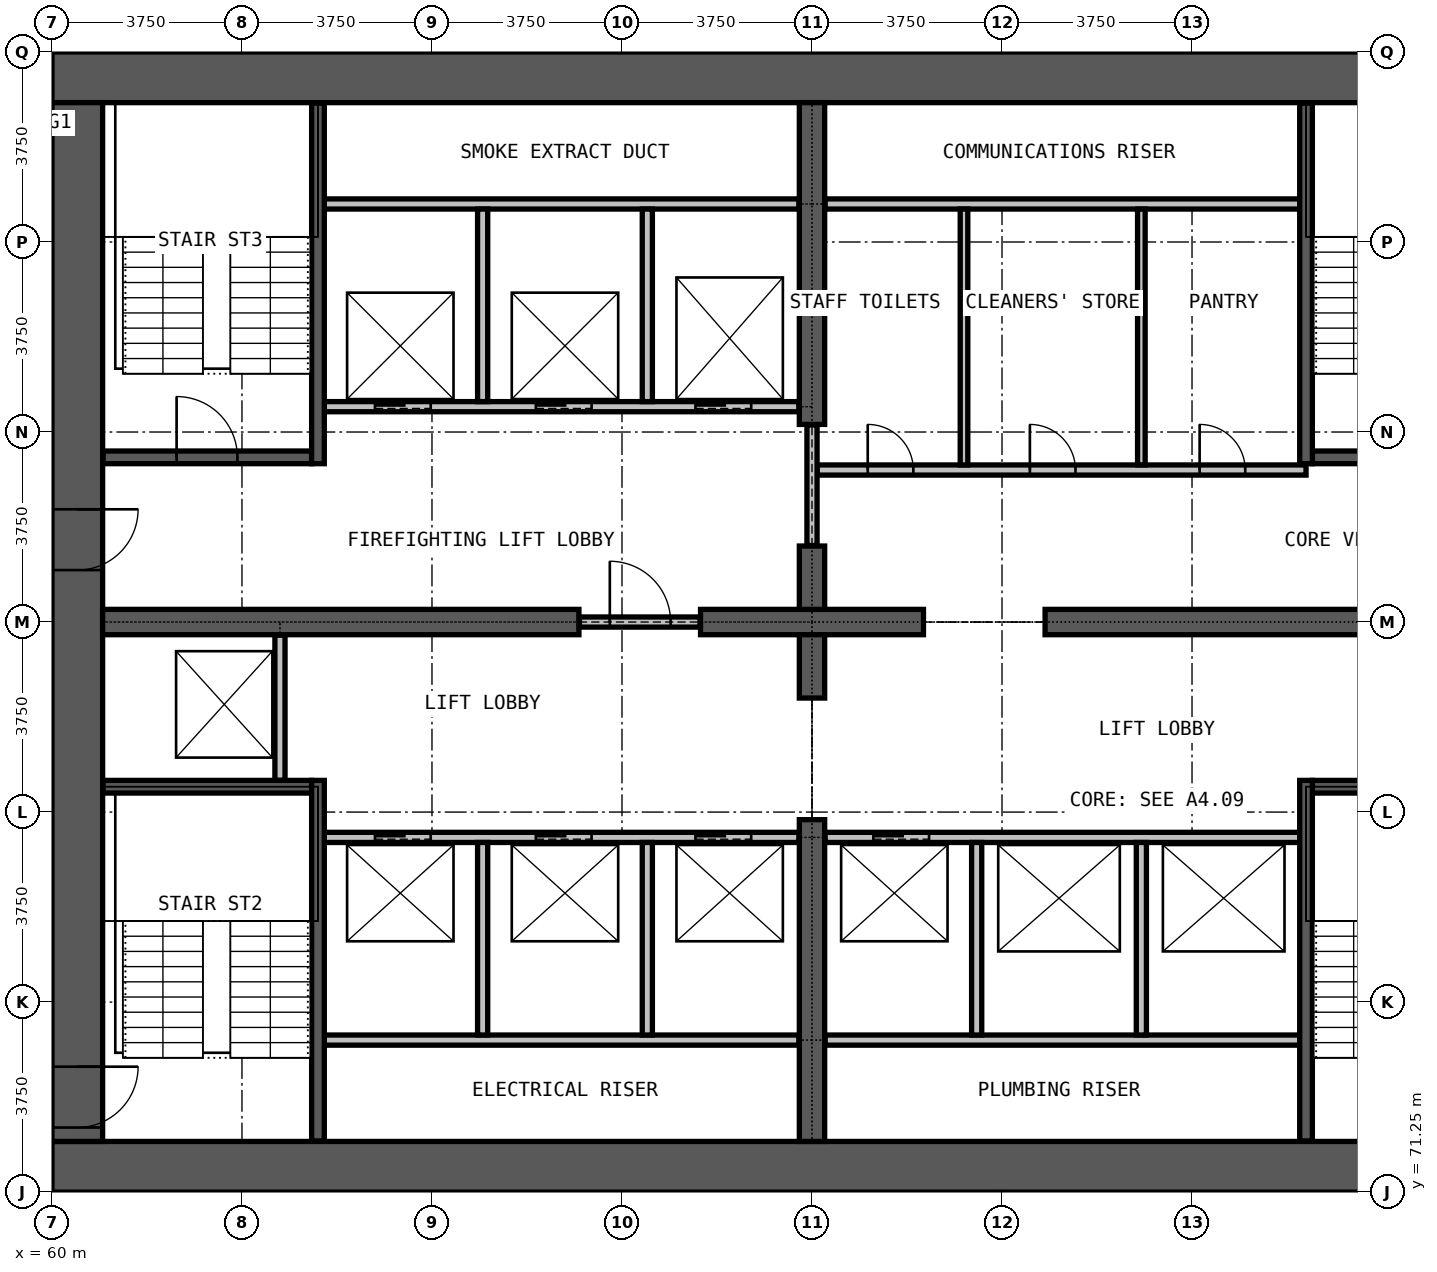
"""IFC4 building model, lengths in metres.
Left out: names, types, materials, properties, quantities, classifications, styles, units other than length and angle.
Written with IfcOpenShell. Run it as: python <this file> out.ifc"""

import sys

from ifc_helpers import new_model, si_unit, direction, frame, frame_2d, origin, place, context, subcontext, project, spatial, rectangle, extrude, element, fill, save


model = new_model("IFC4")
c1 = context("Model", 3, precision=1e-05, world=origin(), true_north=direction((0.0, 1.0)))
c2 = subcontext(c1, "Body", "Model", "MODEL_VIEW")
j1 = project(units=[si_unit("LENGTHUNIT", "METRE"), si_unit("PLANEANGLEUNIT", "RADIAN")], contexts=[c1])
p1 = place(None, origin())
s1 = spatial("IfcSite", under=j1, at=p1, CompositionType="ELEMENT")
p2 = place(p1, origin())
s2 = spatial("IfcBuilding", under=s1, at=p2, CompositionType="ELEMENT")
p3 = place(p2, frame((0.0, 0.0, 82.4)))
s3 = spatial("IfcBuildingStorey", under=s2, at=p3, CompositionType="ELEMENT", Elevation=82.4)
for number, where, z_axis, x_axis in (
    (1, (60.0, 71.75, 0.0), (0.0, 0.0, 1.0), (1.0, 0.0, 0.0)),
    (2, (90.0, 93.25, 0.0), (0.0, 0.0, 1.0), (-1.0, 0.0, 0.0)),
):
    element("IfcWall", number, at=place(p3, frame(where, z_axis=z_axis, x_axis=x_axis)), inside=s3, PredefinedType="SHEAR", context=c2, shape_type="SweptSolid", body=[
        extrude(rectangle(XDim=30.0, YDim=1.0, at=frame_2d((15.0, 0.0))), origin(), (0.0, 0.0, 1.0), 3.3),
    ])
p4 = place(p3, frame((60.5, 92.75, 0.0), z_axis=(0.0, 0.0, 1.0), x_axis=(0.0, -1.0, 0.0)))
e3 = element("IfcWall", 3, at=p4, inside=s3, PredefinedType="SHEAR", context=c2, shape_type="SweptSolid", body=[
    extrude(rectangle(XDim=20.5, YDim=1.0, at=frame_2d((10.25, 0.0))), origin(), (0.0, 0.0, 1.0), 3.3),
])
p5 = place(p4, frame((19.025, 0.0, 0.0)))
e4 = element("IfcOpeningElement", 4, at=p5, cuts=e3, PredefinedType="OPENING", context=c2, shape_type="SweptSolid", body=[
    extrude(rectangle(XDim=1.2, YDim=2.2, at=frame_2d((0.6, 1.1))), frame((0.0, 0.51, 0.0), z_axis=(0.0, -1.0, 0.0), x_axis=(1.0, 0.0, 0.0)), (0.0, 0.0, 1.0), 1.02),
])
p6 = place(p4, frame((8.025, 0.0, 0.0)))
e5 = element("IfcOpeningElement", 5, at=p6, cuts=e3, PredefinedType="OPENING", context=c2, shape_type="SweptSolid", body=[
    extrude(rectangle(XDim=1.2, YDim=2.2, at=frame_2d((0.6, 1.1))), frame((0.0, 0.51, 0.0), z_axis=(0.0, -1.0, 0.0), x_axis=(1.0, 0.0, 0.0)), (0.0, 0.0, 1.0), 1.02),
])
p7 = place(p3, frame((61.0, 82.5, 0.0), z_axis=(0.0, 0.0, 1.0), x_axis=(1.0, 0.0, 0.0)))
e6 = element("IfcWall", 6, at=p7, inside=s3, PredefinedType="SHEAR", context=c2, shape_type="SweptSolid", body=[
    extrude(rectangle(XDim=9.4, YDim=0.5, at=frame_2d((4.7, 0.0))), origin(), (0.0, 0.0, 1.0), 3.3),
])
p8 = place(p3, frame((72.8, 82.5, 0.0), z_axis=(0.0, 0.0, 1.0), x_axis=(1.0, 0.0, 0.0)))
e7 = element("IfcWall", 7, at=p8, inside=s3, PredefinedType="SHEAR", context=c2, shape_type="SweptSolid", body=[
    extrude(rectangle(XDim=4.4, YDim=0.5, at=frame_2d((2.2, 0.0))), origin(), (0.0, 0.0, 1.0), 3.3),
])
p9 = place(p3, frame((79.6, 82.5, 0.0), z_axis=(0.0, 0.0, 1.0), x_axis=(1.0, 0.0, 0.0)))
e8 = element("IfcWall", 8, at=p9, inside=s3, PredefinedType="SHEAR", context=c2, shape_type="SweptSolid", body=[
    extrude(rectangle(XDim=9.4, YDim=0.5, at=frame_2d((4.7, 0.0))), origin(), (0.0, 0.0, 1.0), 3.3),
])
p10 = place(p3, frame((75.0, 72.25, 0.0), z_axis=(0.0, 0.0, 1.0), x_axis=(0.0, 1.0, 0.0)))
e9 = element("IfcWall", 9, at=p10, inside=s3, PredefinedType="SHEAR", context=c2, shape_type="SweptSolid", body=[
    extrude(rectangle(XDim=6.35, YDim=0.5, at=frame_2d((3.175, 0.0))), origin(), (0.0, 0.0, 1.0), 3.3),
])
for number, where, z_axis, x_axis in (
    (10, (75.0, 81.0, 0.0), (0.0, 0.0, 1.0), (0.0, 1.0, 0.0)),
    (11, (75.0, 82.75, 0.0), (0.0, 0.0, 1.0), (0.0, 1.0, 0.0)),
):
    element("IfcWall", number, at=place(p3, frame(where, z_axis=z_axis, x_axis=x_axis)), inside=s3, PredefinedType="SHEAR", context=c2, shape_type="SweptSolid", body=[
        extrude(rectangle(XDim=1.25, YDim=0.5, at=frame_2d((0.625, 0.0))), origin(), (0.0, 0.0, 1.0), 3.3),
    ])
p11 = place(p3, frame((75.0, 86.4, 0.0), z_axis=(0.0, 0.0, 1.0), x_axis=(0.0, 1.0, 0.0)))
e12 = element("IfcWall", 12, at=p11, inside=s3, PredefinedType="SHEAR", context=c2, shape_type="SweptSolid", body=[
    extrude(rectangle(XDim=6.35, YDim=0.5, at=frame_2d((3.175, 0.0))), origin(), (0.0, 0.0, 1.0), 3.3),
])
p12 = place(p3, frame((70.41, 82.5, 0.0), z_axis=(0.0, 0.0, 1.0), x_axis=(1.0, 0.0, 0.0)))
e13 = element("IfcWall", 13, at=p12, inside=s3, PredefinedType="PARTITIONING", context=c2, shape_type="SweptSolid", body=[
    extrude(rectangle(XDim=2.38, YDim=0.2, at=frame_2d((1.19, 0.0))), origin(), (0.0, 0.0, 1.0), 2.4),
])
p13 = place(p12, frame((0.6, 0.0, 0.0)))
e14 = element("IfcOpeningElement", 14, at=p13, cuts=e13, PredefinedType="OPENING", context=c2, shape_type="SweptSolid", body=[
    extrude(rectangle(XDim=1.2, YDim=2.2, at=frame_2d((0.6, 1.1))), frame((0.0, 0.11, 0.0), z_axis=(0.0, -1.0, 0.0), x_axis=(1.0, 0.0, 0.0)), (0.0, 0.0, 1.0), 0.22),
])
p14 = place(p3, frame((75.1, 85.5, 0.0), z_axis=(0.0, 0.0, 1.0), x_axis=(1.0, 0.0, 0.0)))
e15 = element("IfcWall", 15, at=p14, inside=s3, PredefinedType="PARTITIONING", context=c2, shape_type="SweptSolid", body=[
    extrude(rectangle(XDim=9.65, YDim=0.2, at=frame_2d((4.825, 0.0))), origin(), (0.0, 0.0, 1.0), 3.0),
])
p15 = place(p14, frame((1.0, 0.0, 0.0)))
e16 = element("IfcOpeningElement", 16, at=p15, cuts=e15, PredefinedType="OPENING", context=c2, shape_type="SweptSolid", body=[
    extrude(rectangle(XDim=0.9, YDim=2.2, at=frame_2d((0.45, 1.1))), frame((0.0, 0.11, 0.0), z_axis=(0.0, -1.0, 0.0), x_axis=(1.0, 0.0, 0.0)), (0.0, 0.0, 1.0), 0.22),
])
p16 = place(p14, frame((4.2, 0.0, 0.0)))
e17 = element("IfcOpeningElement", 17, at=p16, cuts=e15, PredefinedType="OPENING", context=c2, shape_type="SweptSolid", body=[
    extrude(rectangle(XDim=0.9, YDim=2.2, at=frame_2d((0.45, 1.1))), frame((0.0, 0.11, 0.0), z_axis=(0.0, -1.0, 0.0), x_axis=(1.0, 0.0, 0.0)), (0.0, 0.0, 1.0), 0.22),
])
p17 = place(p14, frame((7.55, 0.0, 0.0)))
e18 = element("IfcOpeningElement", 18, at=p17, cuts=e15, PredefinedType="OPENING", context=c2, shape_type="SweptSolid", body=[
    extrude(rectangle(XDim=0.9, YDim=2.2, at=frame_2d((0.45, 1.1))), frame((0.0, 0.11, 0.0), z_axis=(0.0, -1.0, 0.0), x_axis=(1.0, 0.0, 0.0)), (0.0, 0.0, 1.0), 0.22),
])
p18 = place(p3, frame((75.26, 90.75, 0.0), z_axis=(0.0, 0.0, 1.0), x_axis=(1.0, 0.0, 0.0)))
e19 = element("IfcWall", 19, at=p18, inside=s3, PredefinedType="PARTITIONING", context=c2, shape_type="SweptSolid", body=[
    extrude(rectangle(XDim=9.365, YDim=0.2, at=frame_2d((4.683, 0.0))), origin(), (0.0, 0.0, 1.0), 3.0),
])
p19 = place(p3, frame((75.0, 84.01, 0.0), z_axis=(0.0, 0.0, 1.0), x_axis=(0.0, 1.0, 0.0)))
e20 = element("IfcWall", 20, at=p19, inside=s3, PredefinedType="PARTITIONING", context=c2, shape_type="SweptSolid", body=[
    extrude(rectangle(XDim=2.38, YDim=0.2, at=frame_2d((1.19, 0.0))), origin(), (0.0, 0.0, 1.0), 2.4),
])
for number, where, z_axis, x_axis in (
    (21, (78.0, 85.6, 0.0), (0.0, 0.0, 1.0), (0.0, 1.0, 0.0)),
    (22, (81.5, 85.6, 0.0), (0.0, 0.0, 1.0), (0.0, 1.0, 0.0)),
):
    element("IfcWall", number, at=place(p3, frame(where, z_axis=z_axis, x_axis=x_axis)), inside=s3, PredefinedType="PARTITIONING", context=c2, shape_type="SweptSolid", body=[
        extrude(rectangle(XDim=5.05, YDim=0.15, at=frame_2d((2.525, 0.0))), origin(), (0.0, 0.0, 1.0), 3.0),
    ])
for number, where, z_axis, x_axis in (
    (23, (65.375, 74.25, 0.0), (0.0, 0.0, 1.0), (1.0, 0.0, 0.0)),
    (24, (75.26, 74.25, 0.0), (0.0, 0.0, 1.0), (1.0, 0.0, 0.0)),
):
    element("IfcWall", number, at=place(p3, frame(where, z_axis=z_axis, x_axis=x_axis)), inside=s3, PredefinedType="PARTITIONING", context=c2, shape_type="SweptSolid", body=[
        extrude(rectangle(XDim=9.365, YDim=0.2, at=frame_2d((4.683, 0.0))), origin(), (0.0, 0.0, 1.0), 3.0),
    ])
p20 = place(p3, frame((65.375, 78.25, 0.0), z_axis=(0.0, 0.0, 1.0), x_axis=(1.0, 0.0, 0.0)))
e25 = element("IfcWall", 25, at=p20, inside=s3, PredefinedType="PARTITIONING", context=c2, shape_type="SweptSolid", body=[
    extrude(rectangle(XDim=9.365, YDim=0.2, at=frame_2d((4.683, 0.0))), origin(), (0.0, 0.0, 1.0), 3.0),
])
p21 = place(p20, frame((1.0, 0.0, 0.0)))
e26 = element("IfcOpeningElement", 26, at=p21, cuts=e25, PredefinedType="OPENING", context=c2, shape_type="SweptSolid", body=[
    extrude(rectangle(XDim=1.1, YDim=2.2, at=frame_2d((0.55, 1.1))), frame((0.0, 0.11, 0.0), z_axis=(0.0, -1.0, 0.0), x_axis=(1.0, 0.0, 0.0)), (0.0, 0.0, 1.0), 0.22),
])
p22 = place(p20, frame((4.175, 0.0, 0.0)))
e27 = element("IfcOpeningElement", 27, at=p22, cuts=e25, PredefinedType="OPENING", context=c2, shape_type="SweptSolid", body=[
    extrude(rectangle(XDim=1.1, YDim=2.2, at=frame_2d((0.55, 1.1))), frame((0.0, 0.11, 0.0), z_axis=(0.0, -1.0, 0.0), x_axis=(1.0, 0.0, 0.0)), (0.0, 0.0, 1.0), 0.22),
])
p23 = place(p20, frame((7.325, 0.0, 0.0)))
e28 = element("IfcOpeningElement", 28, at=p23, cuts=e25, PredefinedType="OPENING", context=c2, shape_type="SweptSolid", body=[
    extrude(rectangle(XDim=1.1, YDim=2.2, at=frame_2d((0.55, 1.1))), frame((0.0, 0.11, 0.0), z_axis=(0.0, -1.0, 0.0), x_axis=(1.0, 0.0, 0.0)), (0.0, 0.0, 1.0), 0.22),
])
p24 = place(p3, frame((75.26, 78.25, 0.0), z_axis=(0.0, 0.0, 1.0), x_axis=(1.0, 0.0, 0.0)))
e29 = element("IfcWall", 29, at=p24, inside=s3, PredefinedType="PARTITIONING", context=c2, shape_type="SweptSolid", body=[
    extrude(rectangle(XDim=9.365, YDim=0.2, at=frame_2d((4.683, 0.0))), origin(), (0.0, 0.0, 1.0), 3.0),
])
p25 = place(p24, frame((0.95, 0.0, 0.0)))
e30 = element("IfcOpeningElement", 30, at=p25, cuts=e29, PredefinedType="OPENING", context=c2, shape_type="SweptSolid", body=[
    extrude(rectangle(XDim=1.1, YDim=2.2, at=frame_2d((0.55, 1.1))), frame((0.0, 0.11, 0.0), z_axis=(0.0, -1.0, 0.0), x_axis=(1.0, 0.0, 0.0)), (0.0, 0.0, 1.0), 0.22),
])
p26 = place(p3, frame((65.375, 86.75, 0.0), z_axis=(0.0, 0.0, 1.0), x_axis=(1.0, 0.0, 0.0)))
e31 = element("IfcWall", 31, at=p26, inside=s3, PredefinedType="PARTITIONING", context=c2, shape_type="SweptSolid", body=[
    extrude(rectangle(XDim=9.365, YDim=0.2, at=frame_2d((4.683, 0.0))), origin(), (0.0, 0.0, 1.0), 3.0),
])
p27 = place(p26, frame((1.0, 0.0, 0.0)))
e32 = element("IfcOpeningElement", 32, at=p27, cuts=e31, PredefinedType="OPENING", context=c2, shape_type="SweptSolid", body=[
    extrude(rectangle(XDim=1.1, YDim=2.2, at=frame_2d((0.55, 1.1))), frame((0.0, 0.11, 0.0), z_axis=(0.0, -1.0, 0.0), x_axis=(1.0, 0.0, 0.0)), (0.0, 0.0, 1.0), 0.22),
])
p28 = place(p26, frame((4.175, 0.0, 0.0)))
e33 = element("IfcOpeningElement", 33, at=p28, cuts=e31, PredefinedType="OPENING", context=c2, shape_type="SweptSolid", body=[
    extrude(rectangle(XDim=1.1, YDim=2.2, at=frame_2d((0.55, 1.1))), frame((0.0, 0.11, 0.0), z_axis=(0.0, -1.0, 0.0), x_axis=(1.0, 0.0, 0.0)), (0.0, 0.0, 1.0), 0.22),
])
p29 = place(p26, frame((7.325, 0.0, 0.0)))
e34 = element("IfcOpeningElement", 34, at=p29, cuts=e31, PredefinedType="OPENING", context=c2, shape_type="SweptSolid", body=[
    extrude(rectangle(XDim=1.1, YDim=2.2, at=frame_2d((0.55, 1.1))), frame((0.0, 0.11, 0.0), z_axis=(0.0, -1.0, 0.0), x_axis=(1.0, 0.0, 0.0)), (0.0, 0.0, 1.0), 0.22),
])
p30 = place(p3, frame((65.375, 90.75, 0.0), z_axis=(0.0, 0.0, 1.0), x_axis=(1.0, 0.0, 0.0)))
e35 = element("IfcWall", 35, at=p30, inside=s3, PredefinedType="PARTITIONING", context=c2, shape_type="SweptSolid", body=[
    extrude(rectangle(XDim=9.365, YDim=0.2, at=frame_2d((4.683, 0.0))), origin(), (0.0, 0.0, 1.0), 3.0),
])
p31 = place(p3, frame((64.5, 79.375, 0.0), z_axis=(0.0, 0.0, 1.0), x_axis=(0.0, 1.0, 0.0)))
e36 = element("IfcWall", 36, at=p31, inside=s3, PredefinedType="PARTITIONING", context=c2, shape_type="SweptSolid", body=[
    extrude(rectangle(XDim=2.865, YDim=0.2, at=frame_2d((1.433, 0.0))), origin(), (0.0, 0.0, 1.0), 3.0),
])
for number, where, z_axis, x_axis in (
    (37, (68.5, 74.35, 0.0), (0.0, 0.0, 1.0), (0.0, 1.0, 0.0)),
    (38, (68.5, 86.85, 0.0), (0.0, 0.0, 1.0), (0.0, 1.0, 0.0)),
    (39, (71.75, 74.35, 0.0), (0.0, 0.0, 1.0), (0.0, 1.0, 0.0)),
    (40, (71.75, 86.85, 0.0), (0.0, 0.0, 1.0), (0.0, 1.0, 0.0)),
    (41, (78.25, 74.35, 0.0), (0.0, 0.0, 1.0), (0.0, 1.0, 0.0)),
    (42, (81.5, 74.35, 0.0), (0.0, 0.0, 1.0), (0.0, 1.0, 0.0)),
):
    element("IfcWall", number, at=place(p3, frame(where, z_axis=z_axis, x_axis=x_axis)), inside=s3, PredefinedType="PARTITIONING", context=c2, shape_type="SweptSolid", body=[
        extrude(rectangle(XDim=3.8, YDim=0.2, at=frame_2d((1.9, 0.0))), origin(), (0.0, 0.0, 1.0), 3.0),
    ])
for number, where, z_axis, x_axis in (
    (43, (61.01, 79.25, 0.0), (0.0, 0.0, 1.0), (1.0, 0.0, 0.0)),
    (44, (84.875, 79.25, 0.0), (0.0, 0.0, 1.0), (1.0, 0.0, 0.0)),
):
    element("IfcWall", number, at=place(p3, frame(where, z_axis=z_axis, x_axis=x_axis)), inside=s3, PredefinedType="PARTITIONING", context=c2, shape_type="SweptSolid", body=[
        extrude(rectangle(XDim=4.115, YDim=0.25, at=frame_2d((2.058, 0.0))), origin(), (0.0, 0.0, 1.0), 3.0),
    ])
p32 = place(p3, frame((61.01, 85.75, 0.0), z_axis=(0.0, 0.0, 1.0), x_axis=(1.0, 0.0, 0.0)))
e45 = element("IfcWall", 45, at=p32, inside=s3, PredefinedType="PARTITIONING", context=c2, shape_type="SweptSolid", body=[
    extrude(rectangle(XDim=4.115, YDim=0.25, at=frame_2d((2.058, 0.0))), origin(), (0.0, 0.0, 1.0), 3.0),
])
p33 = place(p32, frame((1.45, 0.0, 0.0)))
e46 = element("IfcOpeningElement", 46, at=p33, cuts=e45, PredefinedType="OPENING", context=c2, shape_type="SweptSolid", body=[
    extrude(rectangle(XDim=1.2, YDim=2.2, at=frame_2d((0.6, 1.1))), frame((0.0, 0.135, 0.0), z_axis=(0.0, -1.0, 0.0), x_axis=(1.0, 0.0, 0.0)), (0.0, 0.0, 1.0), 0.27),
])
p34 = place(p3, frame((84.875, 85.75, 0.0), z_axis=(0.0, 0.0, 1.0), x_axis=(1.0, 0.0, 0.0)))
e47 = element("IfcWall", 47, at=p34, inside=s3, PredefinedType="PARTITIONING", context=c2, shape_type="SweptSolid", body=[
    extrude(rectangle(XDim=4.115, YDim=0.25, at=frame_2d((2.058, 0.0))), origin(), (0.0, 0.0, 1.0), 3.0),
])
for number, where, z_axis, x_axis in (
    (48, (65.25, 72.26, 0.0), (0.0, 0.0, 1.0), (0.0, 1.0, 0.0)),
    (49, (65.25, 85.625, 0.0), (0.0, 0.0, 1.0), (0.0, 1.0, 0.0)),
    (50, (84.75, 72.26, 0.0), (0.0, 0.0, 1.0), (0.0, 1.0, 0.0)),
    (51, (84.75, 85.625, 0.0), (0.0, 0.0, 1.0), (0.0, 1.0, 0.0)),
):
    element("IfcWall", number, at=place(p3, frame(where, z_axis=z_axis, x_axis=x_axis)), inside=s3, PredefinedType="PARTITIONING", context=c2, shape_type="SweptSolid", body=[
        extrude(rectangle(XDim=7.115, YDim=0.25, at=frame_2d((3.558, 0.0))), origin(), (0.0, 0.0, 1.0), 3.0),
    ])
p35 = place(p21, origin())
e52 = element("IfcDoor", 52, at=p35, inside=s3, OperationType="DOUBLE_DOOR_SLIDING", PredefinedType="DOOR", context=c2, shape_type="SweptSolid", body=[
    extrude(rectangle(XDim=1.1, YDim=2.2, at=frame_2d((0.55, 1.1))), frame((0.0, 0.025, 0.0), z_axis=(0.0, -1.0, 0.0), x_axis=(1.0, 0.0, 0.0)), (0.0, 0.0, 1.0), 0.05),
])
fill(e26, e52)
p36 = place(p22, origin())
e53 = element("IfcDoor", 53, at=p36, inside=s3, OperationType="DOUBLE_DOOR_SLIDING", PredefinedType="DOOR", context=c2, shape_type="SweptSolid", body=[
    extrude(rectangle(XDim=1.1, YDim=2.2, at=frame_2d((0.55, 1.1))), frame((0.0, 0.025, 0.0), z_axis=(0.0, -1.0, 0.0), x_axis=(1.0, 0.0, 0.0)), (0.0, 0.0, 1.0), 0.05),
])
fill(e27, e53)
p37 = place(p23, origin())
e54 = element("IfcDoor", 54, at=p37, inside=s3, OperationType="DOUBLE_DOOR_SLIDING", PredefinedType="DOOR", context=c2, shape_type="SweptSolid", body=[
    extrude(rectangle(XDim=1.1, YDim=2.2, at=frame_2d((0.55, 1.1))), frame((0.0, 0.025, 0.0), z_axis=(0.0, -1.0, 0.0), x_axis=(1.0, 0.0, 0.0)), (0.0, 0.0, 1.0), 0.05),
])
fill(e28, e54)
p38 = place(p25, origin())
e55 = element("IfcDoor", 55, at=p38, inside=s3, OperationType="DOUBLE_DOOR_SLIDING", PredefinedType="DOOR", context=c2, shape_type="SweptSolid", body=[
    extrude(rectangle(XDim=1.1, YDim=2.2, at=frame_2d((0.55, 1.1))), frame((0.0, 0.025, 0.0), z_axis=(0.0, -1.0, 0.0), x_axis=(1.0, 0.0, 0.0)), (0.0, 0.0, 1.0), 0.05),
])
fill(e30, e55)
p39 = place(p27, origin())
e56 = element("IfcDoor", 56, at=p39, inside=s3, OperationType="DOUBLE_DOOR_SLIDING", PredefinedType="DOOR", context=c2, shape_type="SweptSolid", body=[
    extrude(rectangle(XDim=1.1, YDim=2.2, at=frame_2d((0.55, 1.1))), frame((0.0, 0.025, 0.0), z_axis=(0.0, -1.0, 0.0), x_axis=(1.0, 0.0, 0.0)), (0.0, 0.0, 1.0), 0.05),
])
fill(e32, e56)
p40 = place(p28, origin())
e57 = element("IfcDoor", 57, at=p40, inside=s3, OperationType="DOUBLE_DOOR_SLIDING", PredefinedType="DOOR", context=c2, shape_type="SweptSolid", body=[
    extrude(rectangle(XDim=1.1, YDim=2.2, at=frame_2d((0.55, 1.1))), frame((0.0, 0.025, 0.0), z_axis=(0.0, -1.0, 0.0), x_axis=(1.0, 0.0, 0.0)), (0.0, 0.0, 1.0), 0.05),
])
fill(e33, e57)
p41 = place(p29, origin())
e58 = element("IfcDoor", 58, at=p41, inside=s3, OperationType="DOUBLE_DOOR_SLIDING", PredefinedType="DOOR", context=c2, shape_type="SweptSolid", body=[
    extrude(rectangle(XDim=1.1, YDim=2.2, at=frame_2d((0.55, 1.1))), frame((0.0, 0.025, 0.0), z_axis=(0.0, -1.0, 0.0), x_axis=(1.0, 0.0, 0.0)), (0.0, 0.0, 1.0), 0.05),
])
fill(e34, e58)
p42 = place(p13, origin())
e59 = element("IfcDoor", 59, at=p42, inside=s3, OperationType="SINGLE_SWING_LEFT", PredefinedType="DOOR", context=c2, shape_type="SweptSolid", body=[
    extrude(rectangle(XDim=1.2, YDim=2.2, at=frame_2d((0.6, 1.1))), frame((0.0, 0.025, 0.0), z_axis=(0.0, -1.0, 0.0), x_axis=(1.0, 0.0, 0.0)), (0.0, 0.0, 1.0), 0.05),
])
fill(e14, e59)
p43 = place(p33, origin())
e60 = element("IfcDoor", 60, at=p43, inside=s3, OperationType="SINGLE_SWING_LEFT", PredefinedType="DOOR", context=c2, shape_type="SweptSolid", body=[
    extrude(rectangle(XDim=1.2, YDim=2.2, at=frame_2d((0.6, 1.1))), frame((0.0, 0.025, 0.0), z_axis=(0.0, -1.0, 0.0), x_axis=(1.0, 0.0, 0.0)), (0.0, 0.0, 1.0), 0.05),
])
fill(e46, e60)
p44 = place(p5, origin())
e61 = element("IfcDoor", 61, at=p44, inside=s3, OperationType="SINGLE_SWING_LEFT", PredefinedType="DOOR", context=c2, shape_type="SweptSolid", body=[
    extrude(rectangle(XDim=1.2, YDim=2.2, at=frame_2d((0.6, 1.1))), frame((0.0, 0.025, 0.0), z_axis=(0.0, -1.0, 0.0), x_axis=(1.0, 0.0, 0.0)), (0.0, 0.0, 1.0), 0.05),
])
fill(e4, e61)
p45 = place(p6, origin())
e62 = element("IfcDoor", 62, at=p45, inside=s3, OperationType="SINGLE_SWING_RIGHT", PredefinedType="DOOR", context=c2, shape_type="SweptSolid", body=[
    extrude(rectangle(XDim=1.2, YDim=2.2, at=frame_2d((0.6, 1.1))), frame((0.0, 0.025, 0.0), z_axis=(0.0, -1.0, 0.0), x_axis=(1.0, 0.0, 0.0)), (0.0, 0.0, 1.0), 0.05),
])
fill(e5, e62)
p46 = place(p15, origin())
e63 = element("IfcDoor", 63, at=p46, inside=s3, OperationType="SINGLE_SWING_LEFT", PredefinedType="DOOR", context=c2, shape_type="SweptSolid", body=[
    extrude(rectangle(XDim=0.9, YDim=2.2, at=frame_2d((0.45, 1.1))), frame((0.0, 0.025, 0.0), z_axis=(0.0, -1.0, 0.0), x_axis=(1.0, 0.0, 0.0)), (0.0, 0.0, 1.0), 0.05),
])
fill(e16, e63)
p47 = place(p16, origin())
e64 = element("IfcDoor", 64, at=p47, inside=s3, OperationType="SINGLE_SWING_RIGHT", PredefinedType="DOOR", context=c2, shape_type="SweptSolid", body=[
    extrude(rectangle(XDim=0.9, YDim=2.2, at=frame_2d((0.45, 1.1))), frame((0.0, 0.025, 0.0), z_axis=(0.0, -1.0, 0.0), x_axis=(1.0, 0.0, 0.0)), (0.0, 0.0, 1.0), 0.05),
])
fill(e17, e64)
p48 = place(p17, origin())
e65 = element("IfcDoor", 65, at=p48, inside=s3, OperationType="SINGLE_SWING_RIGHT", PredefinedType="DOOR", context=c2, shape_type="SweptSolid", body=[
    extrude(rectangle(XDim=0.9, YDim=2.2, at=frame_2d((0.45, 1.1))), frame((0.0, 0.025, 0.0), z_axis=(0.0, -1.0, 0.0), x_axis=(1.0, 0.0, 0.0)), (0.0, 0.0, 1.0), 0.05),
])
fill(e18, e65)
save(model, sys.argv[1])
